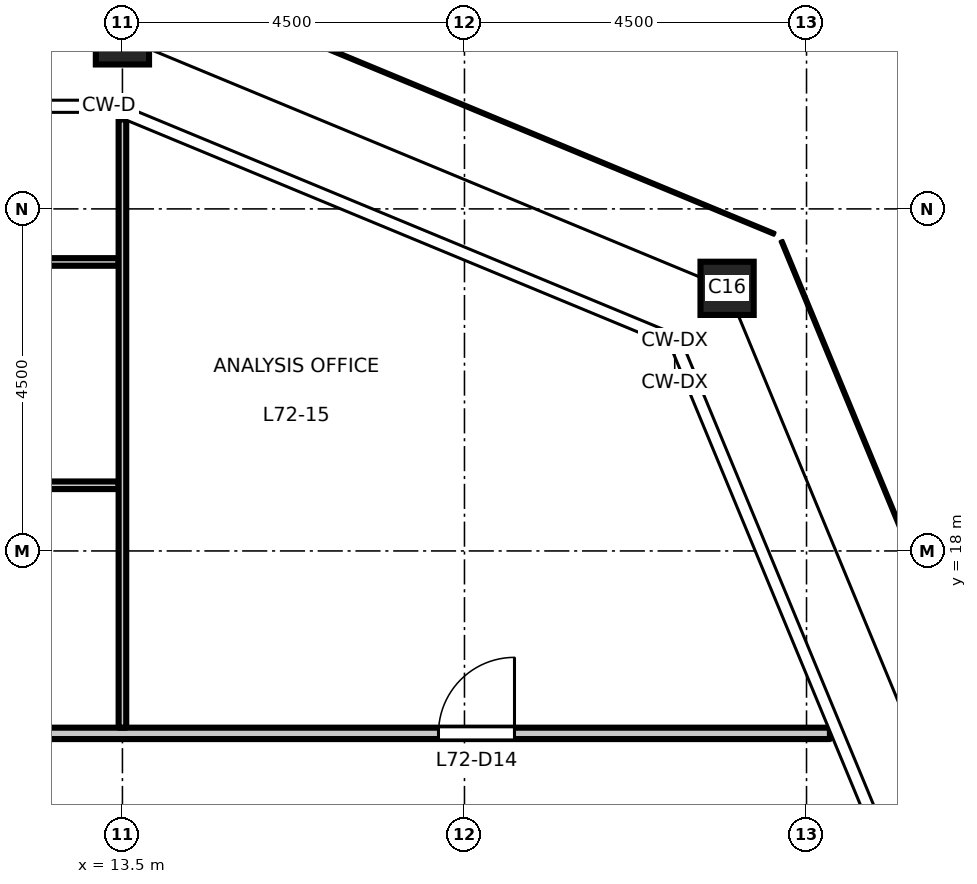
"""IFC4 building model, lengths in metres.
Left out: names, types, materials, properties, quantities, classifications, styles, units other than length and angle.
Written with IfcOpenShell. Run it as: python <this file> out.ifc"""

import sys

from ifc_helpers import new_model, si_unit, direction, frame, frame_2d, origin, origin_2d, place, context, subcontext, project, spatial, rectangle, hollow_rectangle, extrude, element, fill, save


model = new_model("IFC4")
c1 = context("Model", 3, precision=1e-05, world=origin(), true_north=direction((0.0, 1.0)))
c2 = subcontext(c1, "Body", "Model", "MODEL_VIEW")
j1 = project(units=[si_unit("LENGTHUNIT", "METRE"), si_unit("PLANEANGLEUNIT", "RADIAN")], contexts=[c1])
p1 = place(None, origin())
s1 = spatial("IfcSite", under=j1, at=p1, CompositionType="ELEMENT")
p2 = place(p1, origin())
s2 = spatial("IfcBuilding", under=s1, at=p2, CompositionType="ELEMENT")
p3 = place(p2, frame((0.0, 0.0, 334.7)))
s3 = spatial("IfcBuildingStorey", under=s2, at=p3, CompositionType="ELEMENT", Elevation=334.7)
for number, where, z_axis, x_axis in (
    (1, (21.455, 21.455, 0.0), (0.0, 0.0, 1.0), (1.0, 0.0, 0.0)),
    (2, (13.5, 24.75, 0.0), (0.0, 0.0, 1.0), (1.0, 0.0, 0.0)),
):
    element("IfcColumn", number, at=place(p3, frame(where, z_axis=z_axis, x_axis=x_axis)), inside=s3, PredefinedType="COLUMN", context=c2, shape_type="SweptSolid", body=[
        extrude(hollow_rectangle(XDim=0.7, YDim=0.7, WallThickness=0.036, at=origin_2d()), origin(), (0.0, 0.0, 1.0), 4.5),
    ])
p4 = place(p3, frame((-22.808, 15.6, 0.0), z_axis=(0.0, 0.0, 1.0), x_axis=(1.0, 0.0, 0.0)))
e3 = element("IfcWall", 3, at=p4, inside=s3, PredefinedType="PARTITIONING", context=c2, shape_type="SweptSolid", body=[
    extrude(rectangle(XDim=45.616, YDim=0.15, at=frame_2d((22.808, 0.0))), origin(), (0.0, 0.0, 1.0), 4.35),
])
p5 = place(p4, frame((13.408, 0.0, 0.0)))
e4 = element("IfcOpeningElement", 4, at=p5, cuts=e3, PredefinedType="OPENING", context=c2, shape_type="SweptSolid", body=[
    extrude(rectangle(XDim=1.0, YDim=2.1, at=frame_2d((0.5, 1.05))), frame((0.0, 0.085, 0.0), z_axis=(0.0, -1.0, 0.0), x_axis=(1.0, 0.0, 0.0)), (0.0, 0.0, 1.0), 0.17),
])
p6 = place(p4, frame((22.408, 0.0, 0.0)))
e5 = element("IfcOpeningElement", 5, at=p6, cuts=e3, PredefinedType="OPENING", context=c2, shape_type="SweptSolid", body=[
    extrude(rectangle(XDim=1.0, YDim=2.1, at=frame_2d((0.5, 1.05))), frame((0.0, 0.085, 0.0), z_axis=(0.0, -1.0, 0.0), x_axis=(1.0, 0.0, 0.0)), (0.0, 0.0, 1.0), 0.17),
])
p7 = place(p4, frame((31.408, 0.0, 0.0)))
e6 = element("IfcOpeningElement", 6, at=p7, cuts=e3, PredefinedType="OPENING", context=c2, shape_type="SweptSolid", body=[
    extrude(rectangle(XDim=1.0, YDim=2.1, at=frame_2d((0.5, 1.05))), frame((0.0, 0.085, 0.0), z_axis=(0.0, -1.0, 0.0), x_axis=(1.0, 0.0, 0.0)), (0.0, 0.0, 1.0), 0.17),
])
p8 = place(p4, frame((4.158, 0.0, 0.0)))
e7 = element("IfcOpeningElement", 7, at=p8, cuts=e3, PredefinedType="OPENING", context=c2, shape_type="SweptSolid", body=[
    extrude(rectangle(XDim=1.0, YDim=2.1, at=frame_2d((0.5, 1.05))), frame((0.0, 0.085, 0.0), z_axis=(0.0, -1.0, 0.0), x_axis=(1.0, 0.0, 0.0)), (0.0, 0.0, 1.0), 0.17),
])
p9 = place(p4, frame((40.466, 0.0, 0.0)))
e8 = element("IfcOpeningElement", 8, at=p9, cuts=e3, PredefinedType="OPENING", context=c2, shape_type="SweptSolid", body=[
    extrude(rectangle(XDim=1.0, YDim=2.1, at=frame_2d((0.5, 1.05))), frame((0.0, 0.085, 0.0), z_axis=(0.0, -1.0, 0.0), x_axis=(1.0, 0.0, 0.0)), (0.0, 0.0, 1.0), 0.17),
])
p10 = place(p3, frame((4.55, 18.864, 0.0), z_axis=(0.0, 0.0, 1.0), x_axis=(1.0, 0.0, 0.0)))
e9 = element("IfcWall", 9, at=p10, inside=s3, PredefinedType="PARTITIONING", context=c2, shape_type="SweptSolid", body=[
    extrude(rectangle(XDim=8.9, YDim=0.1, at=frame_2d((4.45, 0.0))), origin(), (0.0, 0.0, 1.0), 4.35),
])
p11 = place(p10, frame((4.05, 0.0, 0.0)))
e10 = element("IfcOpeningElement", 10, at=p11, cuts=e9, PredefinedType="OPENING", context=c2, shape_type="SweptSolid", body=[
    extrude(rectangle(XDim=1.0, YDim=2.1, at=frame_2d((0.5, 1.05))), frame((0.0, 0.06, 0.0), z_axis=(0.0, -1.0, 0.0), x_axis=(1.0, 0.0, 0.0)), (0.0, 0.0, 1.0), 0.12),
])
p12 = place(p3, frame((4.55, 21.802, 0.0), z_axis=(0.0, 0.0, 1.0), x_axis=(1.0, 0.0, 0.0)))
e11 = element("IfcWall", 11, at=p12, inside=s3, PredefinedType="PARTITIONING", context=c2, shape_type="SweptSolid", body=[
    extrude(rectangle(XDim=8.9, YDim=0.1, at=frame_2d((4.45, 0.0))), origin(), (0.0, 0.0, 1.0), 4.35),
])
p13 = place(p12, frame((4.05, 0.0, 0.0)))
e12 = element("IfcOpeningElement", 12, at=p13, cuts=e11, PredefinedType="OPENING", context=c2, shape_type="SweptSolid", body=[
    extrude(rectangle(XDim=1.0, YDim=2.1, at=frame_2d((0.5, 1.05))), frame((0.0, 0.06, 0.0), z_axis=(0.0, -1.0, 0.0), x_axis=(1.0, 0.0, 0.0)), (0.0, 0.0, 1.0), 0.12),
])
p14 = place(p3, frame((13.5, 15.675, 0.0), z_axis=(0.0, 0.0, 1.0), x_axis=(0.0, 1.0, 0.0)))
e13 = element("IfcWall", 13, at=p14, inside=s3, PredefinedType="PARTITIONING", context=c2, shape_type="SweptSolid", body=[
    extrude(rectangle(XDim=8.003, YDim=0.1, at=frame_2d((4.001, 0.0))), origin(), (0.0, 0.0, 1.0), 3.75),
])
p15 = place(p9, origin())
e14 = element("IfcDoor", 14, at=p15, inside=s3, OperationType="SINGLE_SWING_RIGHT", PredefinedType="DOOR", context=c2, shape_type="SweptSolid", body=[
    extrude(rectangle(XDim=1.0, YDim=2.1, at=frame_2d((0.5, 1.05))), frame((0.0, 0.025, 0.0), z_axis=(0.0, -1.0, 0.0), x_axis=(1.0, 0.0, 0.0)), (0.0, 0.0, 1.0), 0.05),
])
fill(e8, e14)
save(model, sys.argv[1])
